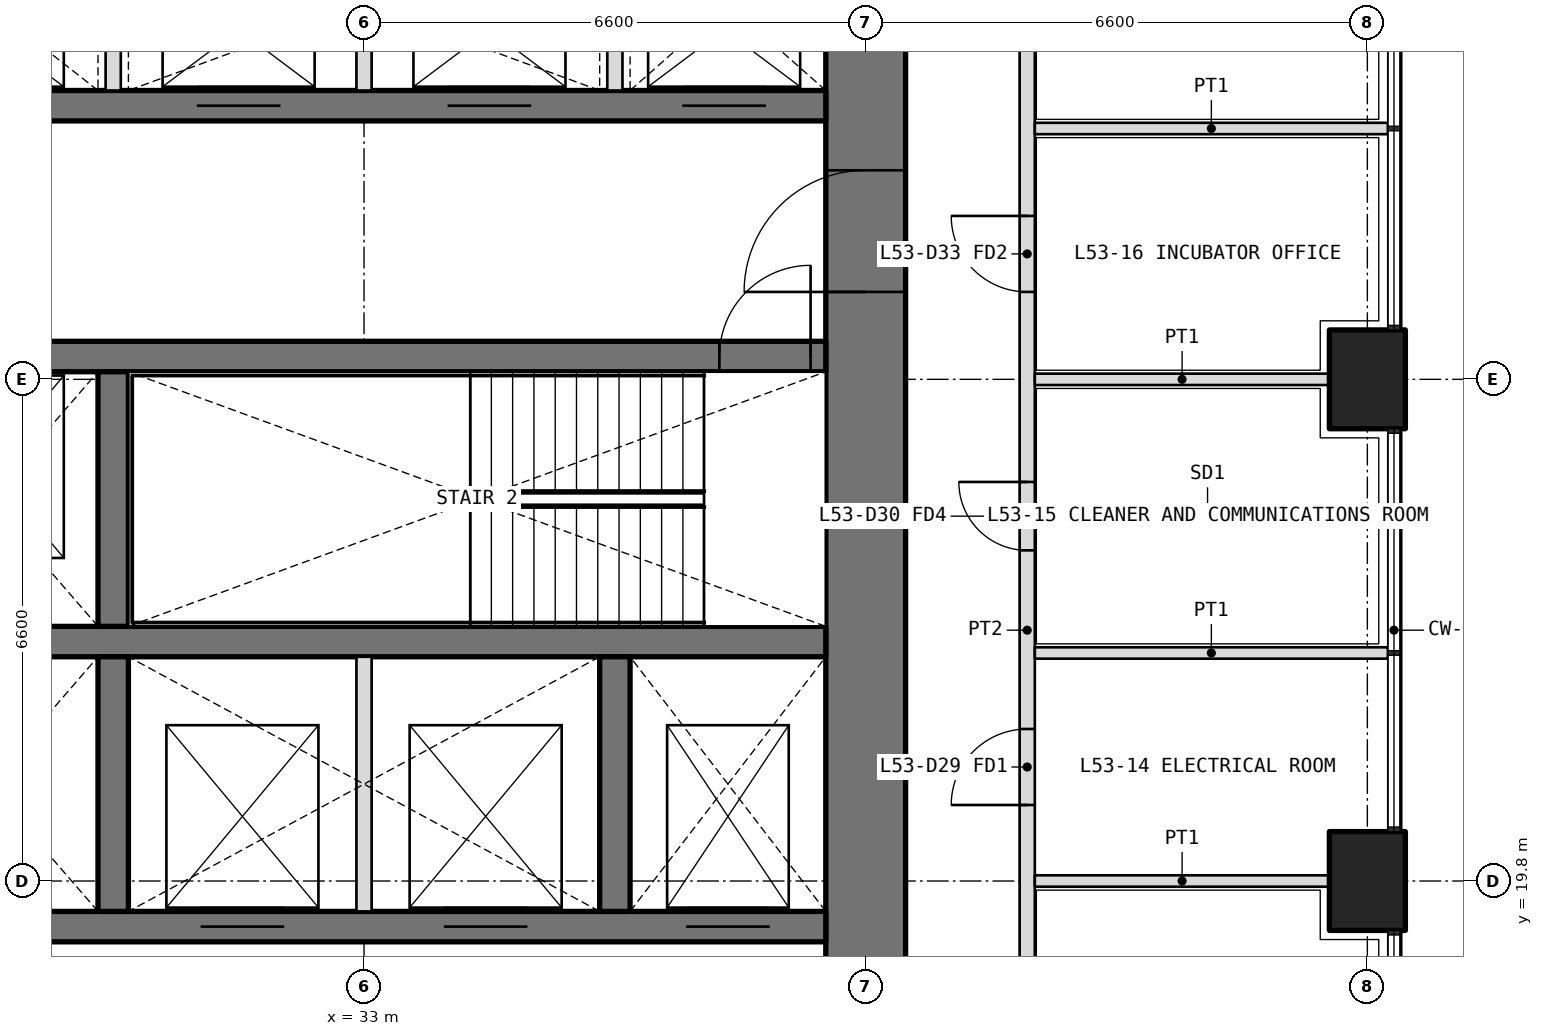
"""IFC4 building model, lengths in metres.
Left out: names, types, materials, properties, quantities, classifications, styles, units other than length and angle.
Written with IfcOpenShell. Run it as: python <this file> out.ifc"""

import sys

from ifc_helpers import new_model, si_unit, direction, frame, frame_2d, origin, origin_2d, place, context, subcontext, project, spatial, rectangle, extrude, element, fill, save


model = new_model("IFC4")
c1 = context("Model", 3, precision=1e-05, world=origin(), true_north=direction((0.0, 1.0)))
c2 = subcontext(c1, "Body", "Model", "MODEL_VIEW")
j1 = project(units=[si_unit("LENGTHUNIT", "METRE"), si_unit("PLANEANGLEUNIT", "RADIAN")], contexts=[c1])
p1 = place(None, origin())
s1 = spatial("IfcSite", under=j1, at=p1, CompositionType="ELEMENT")
p2 = place(p1, origin())
s2 = spatial("IfcBuilding", under=s1, at=p2, CompositionType="ELEMENT")
p3 = place(p2, frame((0.0, 0.0, 233.4)))
s3 = spatial("IfcBuildingStorey", under=s2, at=p3, CompositionType="ELEMENT", Elevation=233.4)
for number, where, z_axis, x_axis in (
    (1, (46.2, 19.8, 0.0), (0.0, 0.0, 1.0), (0.0, 1.0, 0.0)),
    (2, (46.2, 26.4, 0.0), (0.0, 0.0, 1.0), (0.0, 1.0, 0.0)),
):
    element("IfcColumn", number, at=place(p3, frame(where, z_axis=z_axis, x_axis=x_axis)), inside=s3, PredefinedType="COLUMN", context=c2, shape_type="SweptSolid", body=[
        extrude(rectangle(XDim=1.3, YDim=1.0, at=origin_2d()), origin(), (0.0, 0.0, 1.0), 4.2),
    ])
p4 = place(p3, frame((39.6, 13.725, 0.0), z_axis=(0.0, 0.0, 1.0), x_axis=(0.0, 1.0, 0.0)))
e3 = element("IfcWall", 3, at=p4, inside=s3, PredefinedType="SHEAR", context=c2, shape_type="SweptSolid", body=[
    extrude(rectangle(XDim=18.75, YDim=1.05, at=frame_2d((9.375, 0.0))), origin(), (0.0, 0.0, 1.0), 4.2),
])
p5 = place(p4, frame((3.025, 0.0, 0.0)))
e4 = element("IfcOpeningElement", 4, at=p5, cuts=e3, PredefinedType="OPENING", context=c2, shape_type="SweptSolid", body=[
    extrude(rectangle(XDim=1.6, YDim=2.1, at=frame_2d((0.8, 1.05))), frame((0.0, 0.535, 0.0), z_axis=(0.0, -1.0, 0.0), x_axis=(1.0, 0.0, 0.0)), (0.0, 0.0, 1.0), 1.07),
])
p6 = place(p4, frame((13.825, 0.0, 0.0)))
e5 = element("IfcOpeningElement", 5, at=p6, cuts=e3, PredefinedType="OPENING", context=c2, shape_type="SweptSolid", body=[
    extrude(rectangle(XDim=1.6, YDim=2.1, at=frame_2d((0.8, 1.05))), frame((0.0, 0.535, 0.0), z_axis=(0.0, -1.0, 0.0), x_axis=(1.0, 0.0, 0.0)), (0.0, 0.0, 1.0), 1.07),
])
p7 = place(p3, frame((13.725, 19.2, 0.0), z_axis=(0.0, 0.0, 1.0), x_axis=(1.0, 0.0, 0.0)))
e6 = element("IfcWall", 6, at=p7, inside=s3, PredefinedType="SHEAR", context=c2, shape_type="SweptSolid", body=[
    extrude(rectangle(XDim=25.35, YDim=0.4, at=frame_2d((12.675, 0.0))), origin(), (0.0, 0.0, 1.0), 4.2),
])
p8 = place(p7, frame((10.575, 0.0, 0.0)))
e7 = element("IfcOpeningElement", 7, at=p8, cuts=e6, PredefinedType="OPENING", context=c2, shape_type="SweptSolid", body=[
    extrude(rectangle(XDim=0.9, YDim=2.1, at=frame_2d((0.45, 1.05))), frame((0.0, 0.21, 0.0), z_axis=(0.0, -1.0, 0.0), x_axis=(1.0, 0.0, 0.0)), (0.0, 0.0, 1.0), 0.42),
])
p9 = place(p7, frame((13.875, 0.0, 0.0)))
e8 = element("IfcOpeningElement", 8, at=p9, cuts=e6, PredefinedType="OPENING", context=c2, shape_type="SweptSolid", body=[
    extrude(rectangle(XDim=0.9, YDim=2.1, at=frame_2d((0.45, 1.05))), frame((0.0, 0.21, 0.0), z_axis=(0.0, -1.0, 0.0), x_axis=(1.0, 0.0, 0.0)), (0.0, 0.0, 1.0), 0.42),
])
p10 = place(p7, frame((0.2, 0.0, 0.0)))
e9 = element("IfcOpeningElement", 9, at=p10, cuts=e6, PredefinedType="OPENING", context=c2, shape_type="SweptSolid", body=[
    extrude(rectangle(XDim=1.2, YDim=2.1, at=frame_2d((0.6, 1.05))), frame((0.0, 0.21, 0.0), z_axis=(0.0, -1.0, 0.0), x_axis=(1.0, 0.0, 0.0)), (0.0, 0.0, 1.0), 0.42),
])
p11 = place(p7, frame((23.512, 0.0, 0.0)))
e10 = element("IfcOpeningElement", 10, at=p11, cuts=e6, PredefinedType="OPENING", context=c2, shape_type="SweptSolid", body=[
    extrude(rectangle(XDim=1.1, YDim=2.1, at=frame_2d((0.55, 1.05))), frame((0.0, 0.21, 0.0), z_axis=(0.0, -1.0, 0.0), x_axis=(1.0, 0.0, 0.0)), (0.0, 0.0, 1.0), 0.42),
])
p12 = place(p7, frame((17.125, 0.0, 0.0)))
e11 = element("IfcOpeningElement", 11, at=p12, cuts=e6, PredefinedType="OPENING", context=c2, shape_type="SweptSolid", body=[
    extrude(rectangle(XDim=1.1, YDim=2.1, at=frame_2d((0.55, 1.05))), frame((0.0, 0.21, 0.0), z_axis=(0.0, -1.0, 0.0), x_axis=(1.0, 0.0, 0.0)), (0.0, 0.0, 1.0), 0.42),
])
p13 = place(p7, frame((20.325, 0.0, 0.0)))
e12 = element("IfcOpeningElement", 12, at=p13, cuts=e6, PredefinedType="OPENING", context=c2, shape_type="SweptSolid", body=[
    extrude(rectangle(XDim=1.1, YDim=2.1, at=frame_2d((0.55, 1.05))), frame((0.0, 0.21, 0.0), z_axis=(0.0, -1.0, 0.0), x_axis=(1.0, 0.0, 0.0)), (0.0, 0.0, 1.0), 0.42),
])
p14 = place(p3, frame((13.725, 22.95, 0.0), z_axis=(0.0, 0.0, 1.0), x_axis=(1.0, 0.0, 0.0)))
e13 = element("IfcWall", 13, at=p14, inside=s3, PredefinedType="SHEAR", context=c2, shape_type="SweptSolid", body=[
    extrude(rectangle(XDim=25.35, YDim=0.4, at=frame_2d((12.675, 0.0))), origin(), (0.0, 0.0, 1.0), 4.2),
])
p15 = place(p3, frame((13.725, 26.7, 0.0), z_axis=(0.0, 0.0, 1.0), x_axis=(1.0, 0.0, 0.0)))
e14 = element("IfcWall", 14, at=p15, inside=s3, PredefinedType="SHEAR", context=c2, shape_type="SweptSolid", body=[
    extrude(rectangle(XDim=25.35, YDim=0.4, at=frame_2d((12.675, 0.0))), origin(), (0.0, 0.0, 1.0), 4.2),
])
p16 = place(p15, frame((23.95, 0.0, 0.0)))
e15 = element("IfcOpeningElement", 15, at=p16, cuts=e14, PredefinedType="OPENING", context=c2, shape_type="SweptSolid", body=[
    extrude(rectangle(XDim=1.2, YDim=2.1, at=frame_2d((0.6, 1.05))), frame((0.0, 0.21, 0.0), z_axis=(0.0, -1.0, 0.0), x_axis=(1.0, 0.0, 0.0)), (0.0, 0.0, 1.0), 0.42),
])
p17 = place(p15, frame((0.738, 0.0, 0.0)))
e16 = element("IfcOpeningElement", 16, at=p17, cuts=e14, PredefinedType="OPENING", context=c2, shape_type="SweptSolid", body=[
    extrude(rectangle(XDim=1.1, YDim=2.1, at=frame_2d((0.55, 1.05))), frame((0.0, 0.21, 0.0), z_axis=(0.0, -1.0, 0.0), x_axis=(1.0, 0.0, 0.0)), (0.0, 0.0, 1.0), 0.42),
])
p18 = place(p15, frame((3.925, 0.0, 0.0)))
e17 = element("IfcOpeningElement", 17, at=p18, cuts=e14, PredefinedType="OPENING", context=c2, shape_type="SweptSolid", body=[
    extrude(rectangle(XDim=1.1, YDim=2.1, at=frame_2d((0.55, 1.05))), frame((0.0, 0.21, 0.0), z_axis=(0.0, -1.0, 0.0), x_axis=(1.0, 0.0, 0.0)), (0.0, 0.0, 1.0), 0.42),
])
p19 = place(p15, frame((7.175, 0.0, 0.0)))
e18 = element("IfcOpeningElement", 18, at=p19, cuts=e14, PredefinedType="OPENING", context=c2, shape_type="SweptSolid", body=[
    extrude(rectangle(XDim=1.1, YDim=2.1, at=frame_2d((0.55, 1.05))), frame((0.0, 0.21, 0.0), z_axis=(0.0, -1.0, 0.0), x_axis=(1.0, 0.0, 0.0)), (0.0, 0.0, 1.0), 0.42),
])
p20 = place(p15, frame((10.425, 0.0, 0.0)))
e19 = element("IfcOpeningElement", 19, at=p20, cuts=e14, PredefinedType="OPENING", context=c2, shape_type="SweptSolid", body=[
    extrude(rectangle(XDim=1.1, YDim=2.1, at=frame_2d((0.55, 1.05))), frame((0.0, 0.21, 0.0), z_axis=(0.0, -1.0, 0.0), x_axis=(1.0, 0.0, 0.0)), (0.0, 0.0, 1.0), 0.42),
])
p21 = place(p15, frame((13.775, 0.0, 0.0)))
e20 = element("IfcOpeningElement", 20, at=p21, cuts=e14, PredefinedType="OPENING", context=c2, shape_type="SweptSolid", body=[
    extrude(rectangle(XDim=1.1, YDim=2.1, at=frame_2d((0.55, 1.05))), frame((0.0, 0.21, 0.0), z_axis=(0.0, -1.0, 0.0), x_axis=(1.0, 0.0, 0.0)), (0.0, 0.0, 1.0), 0.42),
])
p22 = place(p3, frame((13.725, 30.0, 0.0), z_axis=(0.0, 0.0, 1.0), x_axis=(1.0, 0.0, 0.0)))
e21 = element("IfcWall", 21, at=p22, inside=s3, PredefinedType="SHEAR", context=c2, shape_type="SweptSolid", body=[
    extrude(rectangle(XDim=25.35, YDim=0.4, at=frame_2d((12.675, 0.0))), origin(), (0.0, 0.0, 1.0), 4.2),
])
p23 = place(p22, frame((0.837, 0.0, 0.0)))
e22 = element("IfcOpeningElement", 22, at=p23, cuts=e21, PredefinedType="OPENING", context=c2, shape_type="SweptSolid", body=[
    extrude(rectangle(XDim=1.0, YDim=2.1, at=frame_2d((0.5, 1.05))), frame((0.0, 0.21, 0.0), z_axis=(0.0, -1.0, 0.0), x_axis=(1.0, 0.0, 0.0)), (0.0, 0.0, 1.0), 0.42),
])
p24 = place(p22, frame((3.925, 0.0, 0.0)))
e23 = element("IfcOpeningElement", 23, at=p24, cuts=e21, PredefinedType="OPENING", context=c2, shape_type="SweptSolid", body=[
    extrude(rectangle(XDim=1.0, YDim=2.1, at=frame_2d((0.5, 1.05))), frame((0.0, 0.21, 0.0), z_axis=(0.0, -1.0, 0.0), x_axis=(1.0, 0.0, 0.0)), (0.0, 0.0, 1.0), 0.42),
])
p25 = place(p22, frame((7.225, 0.0, 0.0)))
e24 = element("IfcOpeningElement", 24, at=p25, cuts=e21, PredefinedType="OPENING", context=c2, shape_type="SweptSolid", body=[
    extrude(rectangle(XDim=1.0, YDim=2.1, at=frame_2d((0.5, 1.05))), frame((0.0, 0.21, 0.0), z_axis=(0.0, -1.0, 0.0), x_axis=(1.0, 0.0, 0.0)), (0.0, 0.0, 1.0), 0.42),
])
p26 = place(p22, frame((10.525, 0.0, 0.0)))
e25 = element("IfcOpeningElement", 25, at=p26, cuts=e21, PredefinedType="OPENING", context=c2, shape_type="SweptSolid", body=[
    extrude(rectangle(XDim=1.0, YDim=2.1, at=frame_2d((0.5, 1.05))), frame((0.0, 0.21, 0.0), z_axis=(0.0, -1.0, 0.0), x_axis=(1.0, 0.0, 0.0)), (0.0, 0.0, 1.0), 0.42),
])
p27 = place(p22, frame((13.775, 0.0, 0.0)))
e26 = element("IfcOpeningElement", 26, at=p27, cuts=e21, PredefinedType="OPENING", context=c2, shape_type="SweptSolid", body=[
    extrude(rectangle(XDim=1.1, YDim=2.1, at=frame_2d((0.55, 1.05))), frame((0.0, 0.21, 0.0), z_axis=(0.0, -1.0, 0.0), x_axis=(1.0, 0.0, 0.0)), (0.0, 0.0, 1.0), 0.42),
])
p28 = place(p22, frame((17.075, 0.0, 0.0)))
e27 = element("IfcOpeningElement", 27, at=p28, cuts=e21, PredefinedType="OPENING", context=c2, shape_type="SweptSolid", body=[
    extrude(rectangle(XDim=1.1, YDim=2.1, at=frame_2d((0.55, 1.05))), frame((0.0, 0.21, 0.0), z_axis=(0.0, -1.0, 0.0), x_axis=(1.0, 0.0, 0.0)), (0.0, 0.0, 1.0), 0.42),
])
p29 = place(p22, frame((20.375, 0.0, 0.0)))
e28 = element("IfcOpeningElement", 28, at=p29, cuts=e21, PredefinedType="OPENING", context=c2, shape_type="SweptSolid", body=[
    extrude(rectangle(XDim=1.1, YDim=2.1, at=frame_2d((0.55, 1.05))), frame((0.0, 0.21, 0.0), z_axis=(0.0, -1.0, 0.0), x_axis=(1.0, 0.0, 0.0)), (0.0, 0.0, 1.0), 0.42),
])
p30 = place(p22, frame((23.462, 0.0, 0.0)))
e29 = element("IfcOpeningElement", 29, at=p30, cuts=e21, PredefinedType="OPENING", context=c2, shape_type="SweptSolid", body=[
    extrude(rectangle(XDim=1.1, YDim=2.1, at=frame_2d((0.55, 1.05))), frame((0.0, 0.21, 0.0), z_axis=(0.0, -1.0, 0.0), x_axis=(1.0, 0.0, 0.0)), (0.0, 0.0, 1.0), 0.42),
])
for number, where, z_axis, x_axis in (
    (30, (29.7, 19.4, 0.0), (0.0, 0.0, 1.0), (0.0, 1.0, 0.0)),
    (31, (36.3, 19.4, 0.0), (0.0, 0.0, 1.0), (0.0, 1.0, 0.0)),
    (32, (29.7, 23.15, 0.0), (0.0, 0.0, 1.0), (0.0, 1.0, 0.0)),
):
    element("IfcWall", number, at=place(p3, frame(where, z_axis=z_axis, x_axis=x_axis)), inside=s3, PredefinedType="SHEAR", context=c2, shape_type="SweptSolid", body=[
        extrude(rectangle(XDim=3.35, YDim=0.4, at=frame_2d((1.675, 0.0))), origin(), (0.0, 0.0, 1.0), 4.2),
    ])
for number, where, z_axis, x_axis in (
    (33, (29.7, 30.2, 0.0), (0.0, 0.0, 1.0), (0.0, 1.0, 0.0)),
    (34, (33.0, 30.2, 0.0), (0.0, 0.0, 1.0), (0.0, 1.0, 0.0)),
    (35, (36.3, 30.2, 0.0), (0.0, 0.0, 1.0), (0.0, 1.0, 0.0)),
):
    element("IfcWall", number, at=place(p3, frame(where, z_axis=z_axis, x_axis=x_axis)), inside=s3, PredefinedType="PARTITIONING", context=c2, shape_type="SweptSolid", body=[
        extrude(rectangle(XDim=2.275, YDim=0.2, at=frame_2d((1.138, 0.0))), origin(), (0.0, 0.0, 1.0), 4.2),
    ])
p31 = place(p3, frame((33.0, 19.4, 0.0), z_axis=(0.0, 0.0, 1.0), x_axis=(0.0, 1.0, 0.0)))
e36 = element("IfcWall", 36, at=p31, inside=s3, PredefinedType="PARTITIONING", context=c2, shape_type="SweptSolid", body=[
    extrude(rectangle(XDim=3.35, YDim=0.2, at=frame_2d((1.675, 0.0))), origin(), (0.0, 0.0, 1.0), 4.2),
])
p32 = place(p3, frame((41.725, 7.4, 0.0), z_axis=(0.0, 0.0, 1.0), x_axis=(0.0, 1.0, 0.0)))
e37 = element("IfcWall", 37, at=p32, inside=s3, PredefinedType="PARTITIONING", context=c2, shape_type="SweptSolid", body=[
    extrude(rectangle(XDim=31.4, YDim=0.2, at=frame_2d((15.7, 0.0))), origin(), (0.0, 0.0, 1.0), 3.0),
])
p33 = place(p32, frame((5.65, 0.0, 0.0)))
e38 = element("IfcOpeningElement", 38, at=p33, cuts=e37, PredefinedType="OPENING", context=c2, shape_type="SweptSolid", body=[
    extrude(rectangle(XDim=1.0, YDim=2.1, at=frame_2d((0.5, 1.05))), frame((0.0, 0.11, 0.0), z_axis=(0.0, -1.0, 0.0), x_axis=(1.0, 0.0, 0.0)), (0.0, 0.0, 1.0), 0.22),
])
p34 = place(p32, frame((13.4, 0.0, 0.0)))
e39 = element("IfcOpeningElement", 39, at=p34, cuts=e37, PredefinedType="OPENING", context=c2, shape_type="SweptSolid", body=[
    extrude(rectangle(XDim=1.0, YDim=2.1, at=frame_2d((0.5, 1.05))), frame((0.0, 0.11, 0.0), z_axis=(0.0, -1.0, 0.0), x_axis=(1.0, 0.0, 0.0)), (0.0, 0.0, 1.0), 0.22),
])
p35 = place(p32, frame((16.75, 0.0, 0.0)))
e40 = element("IfcOpeningElement", 40, at=p35, cuts=e37, PredefinedType="OPENING", context=c2, shape_type="SweptSolid", body=[
    extrude(rectangle(XDim=0.9, YDim=2.1, at=frame_2d((0.45, 1.05))), frame((0.0, 0.11, 0.0), z_axis=(0.0, -1.0, 0.0), x_axis=(1.0, 0.0, 0.0)), (0.0, 0.0, 1.0), 0.22),
])
p36 = place(p32, frame((20.15, 0.0, 0.0)))
e41 = element("IfcOpeningElement", 41, at=p36, cuts=e37, PredefinedType="OPENING", context=c2, shape_type="SweptSolid", body=[
    extrude(rectangle(XDim=1.0, YDim=2.1, at=frame_2d((0.5, 1.05))), frame((0.0, 0.11, 0.0), z_axis=(0.0, -1.0, 0.0), x_axis=(1.0, 0.0, 0.0)), (0.0, 0.0, 1.0), 0.22),
])
p37 = place(p32, frame((26.4, 0.0, 0.0)))
e42 = element("IfcOpeningElement", 42, at=p37, cuts=e37, PredefinedType="OPENING", context=c2, shape_type="SweptSolid", body=[
    extrude(rectangle(XDim=1.0, YDim=2.1, at=frame_2d((0.5, 1.05))), frame((0.0, 0.11, 0.0), z_axis=(0.0, -1.0, 0.0), x_axis=(1.0, 0.0, 0.0)), (0.0, 0.0, 1.0), 0.22),
])
p38 = place(p3, frame((46.47, 22.8, 0.0), z_axis=(0.0, 0.0, 1.0), x_axis=(-1.0, 0.0, 0.0)))
e43 = element("IfcWall", 43, at=p38, inside=s3, PredefinedType="PARTITIONING", context=c2, shape_type="SweptSolid", body=[
    extrude(rectangle(XDim=4.645, YDim=0.15, at=frame_2d((2.323, 0.0))), origin(), (0.0, 0.0, 1.0), 2.7),
])
for number, where, z_axis, x_axis in (
    (44, (45.7, 26.4, 0.0), (0.0, 0.0, 1.0), (-1.0, 0.0, 0.0)),
    (45, (45.7, 19.8, 0.0), (0.0, 0.0, 1.0), (-1.0, 0.0, 0.0)),
):
    element("IfcWall", number, at=place(p3, frame(where, z_axis=z_axis, x_axis=x_axis)), inside=s3, PredefinedType="PARTITIONING", context=c2, shape_type="SweptSolid", body=[
        extrude(rectangle(XDim=3.875, YDim=0.15, at=frame_2d((1.938, 0.0))), origin(), (0.0, 0.0, 1.0), 3.0),
    ])
p39 = place(p3, frame((46.47, 29.7, 0.0), z_axis=(0.0, 0.0, 1.0), x_axis=(-1.0, 0.0, 0.0)))
e46 = element("IfcWall", 46, at=p39, inside=s3, PredefinedType="PARTITIONING", context=c2, shape_type="SweptSolid", body=[
    extrude(rectangle(XDim=4.645, YDim=0.15, at=frame_2d((2.323, 0.0))), origin(), (0.0, 0.0, 1.0), 2.7),
])
p40 = place(p34, origin())
e47 = element("IfcDoor", 47, at=p40, inside=s3, OperationType="SINGLE_SWING_LEFT", PredefinedType="DOOR", context=c2, shape_type="SweptSolid", body=[
    extrude(rectangle(XDim=1.0, YDim=2.1, at=frame_2d((0.5, 1.05))), frame((0.0, 0.025, 0.0), z_axis=(0.0, -1.0, 0.0), x_axis=(1.0, 0.0, 0.0)), (0.0, 0.0, 1.0), 0.05),
])
fill(e39, e47)
p41 = place(p35, origin())
e48 = element("IfcDoor", 48, at=p41, inside=s3, OperationType="SINGLE_SWING_RIGHT", PredefinedType="DOOR", context=c2, shape_type="SweptSolid", body=[
    extrude(rectangle(XDim=0.9, YDim=2.1, at=frame_2d((0.45, 1.05))), frame((0.0, 0.025, 0.0), z_axis=(0.0, -1.0, 0.0), x_axis=(1.0, 0.0, 0.0)), (0.0, 0.0, 1.0), 0.05),
])
fill(e40, e48)
p42 = place(p36, origin())
e49 = element("IfcDoor", 49, at=p42, inside=s3, OperationType="SINGLE_SWING_RIGHT", PredefinedType="DOOR", context=c2, shape_type="SweptSolid", body=[
    extrude(rectangle(XDim=1.0, YDim=2.1, at=frame_2d((0.5, 1.05))), frame((0.0, 0.025, 0.0), z_axis=(0.0, -1.0, 0.0), x_axis=(1.0, 0.0, 0.0)), (0.0, 0.0, 1.0), 0.05),
])
fill(e41, e49)
p43 = place(p16, origin())
e50 = element("IfcDoor", 50, at=p43, inside=s3, OperationType="SINGLE_SWING_RIGHT", PredefinedType="DOOR", context=c2, shape_type="SweptSolid", body=[
    extrude(rectangle(XDim=1.2, YDim=2.1, at=frame_2d((0.6, 1.05))), frame((0.0, 0.025, 0.0), z_axis=(0.0, -1.0, 0.0), x_axis=(1.0, 0.0, 0.0)), (0.0, 0.0, 1.0), 0.05),
])
fill(e15, e50)
p44 = place(p6, origin())
e51 = element("IfcDoor", 51, at=p44, inside=s3, OperationType="DOUBLE_DOOR_DOUBLE_SWING", PredefinedType="DOOR", context=c2, shape_type="SweptSolid", body=[
    extrude(rectangle(XDim=1.6, YDim=2.1, at=frame_2d((0.8, 1.05))), frame((0.0, 0.025, 0.0), z_axis=(0.0, -1.0, 0.0), x_axis=(1.0, 0.0, 0.0)), (0.0, 0.0, 1.0), 0.05),
])
fill(e5, e51)
p45 = place(p28, origin())
e52 = element("IfcDoor", 52, at=p45, inside=s3, OperationType="DOUBLE_DOOR_SLIDING", PredefinedType="DOOR", context=c2, shape_type="SweptSolid", body=[
    extrude(rectangle(XDim=1.1, YDim=2.1, at=frame_2d((0.55, 1.05))), frame((0.0, 0.025, 0.0), z_axis=(0.0, -1.0, 0.0), x_axis=(1.0, 0.0, 0.0)), (0.0, 0.0, 1.0), 0.05),
])
fill(e27, e52)
p46 = place(p29, origin())
e53 = element("IfcDoor", 53, at=p46, inside=s3, OperationType="DOUBLE_DOOR_SLIDING", PredefinedType="DOOR", context=c2, shape_type="SweptSolid", body=[
    extrude(rectangle(XDim=1.1, YDim=2.1, at=frame_2d((0.55, 1.05))), frame((0.0, 0.025, 0.0), z_axis=(0.0, -1.0, 0.0), x_axis=(1.0, 0.0, 0.0)), (0.0, 0.0, 1.0), 0.05),
])
fill(e28, e53)
p47 = place(p30, origin())
e54 = element("IfcDoor", 54, at=p47, inside=s3, OperationType="DOUBLE_DOOR_SLIDING", PredefinedType="DOOR", context=c2, shape_type="SweptSolid", body=[
    extrude(rectangle(XDim=1.1, YDim=2.1, at=frame_2d((0.55, 1.05))), frame((0.0, 0.025, 0.0), z_axis=(0.0, -1.0, 0.0), x_axis=(1.0, 0.0, 0.0)), (0.0, 0.0, 1.0), 0.05),
])
fill(e29, e54)
p48 = place(p11, origin())
e55 = element("IfcDoor", 55, at=p48, inside=s3, OperationType="DOUBLE_DOOR_SLIDING", PredefinedType="DOOR", context=c2, shape_type="SweptSolid", body=[
    extrude(rectangle(XDim=1.1, YDim=2.1, at=frame_2d((0.55, 1.05))), frame((0.0, 0.025, 0.0), z_axis=(0.0, -1.0, 0.0), x_axis=(1.0, 0.0, 0.0)), (0.0, 0.0, 1.0), 0.05),
])
fill(e10, e55)
p49 = place(p12, origin())
e56 = element("IfcDoor", 56, at=p49, inside=s3, OperationType="DOUBLE_DOOR_SLIDING", PredefinedType="DOOR", context=c2, shape_type="SweptSolid", body=[
    extrude(rectangle(XDim=1.1, YDim=2.1, at=frame_2d((0.55, 1.05))), frame((0.0, 0.025, 0.0), z_axis=(0.0, -1.0, 0.0), x_axis=(1.0, 0.0, 0.0)), (0.0, 0.0, 1.0), 0.05),
])
fill(e11, e56)
p50 = place(p13, origin())
e57 = element("IfcDoor", 57, at=p50, inside=s3, OperationType="DOUBLE_DOOR_SLIDING", PredefinedType="DOOR", context=c2, shape_type="SweptSolid", body=[
    extrude(rectangle(XDim=1.1, YDim=2.1, at=frame_2d((0.55, 1.05))), frame((0.0, 0.025, 0.0), z_axis=(0.0, -1.0, 0.0), x_axis=(1.0, 0.0, 0.0)), (0.0, 0.0, 1.0), 0.05),
])
fill(e12, e57)
save(model, sys.argv[1])
